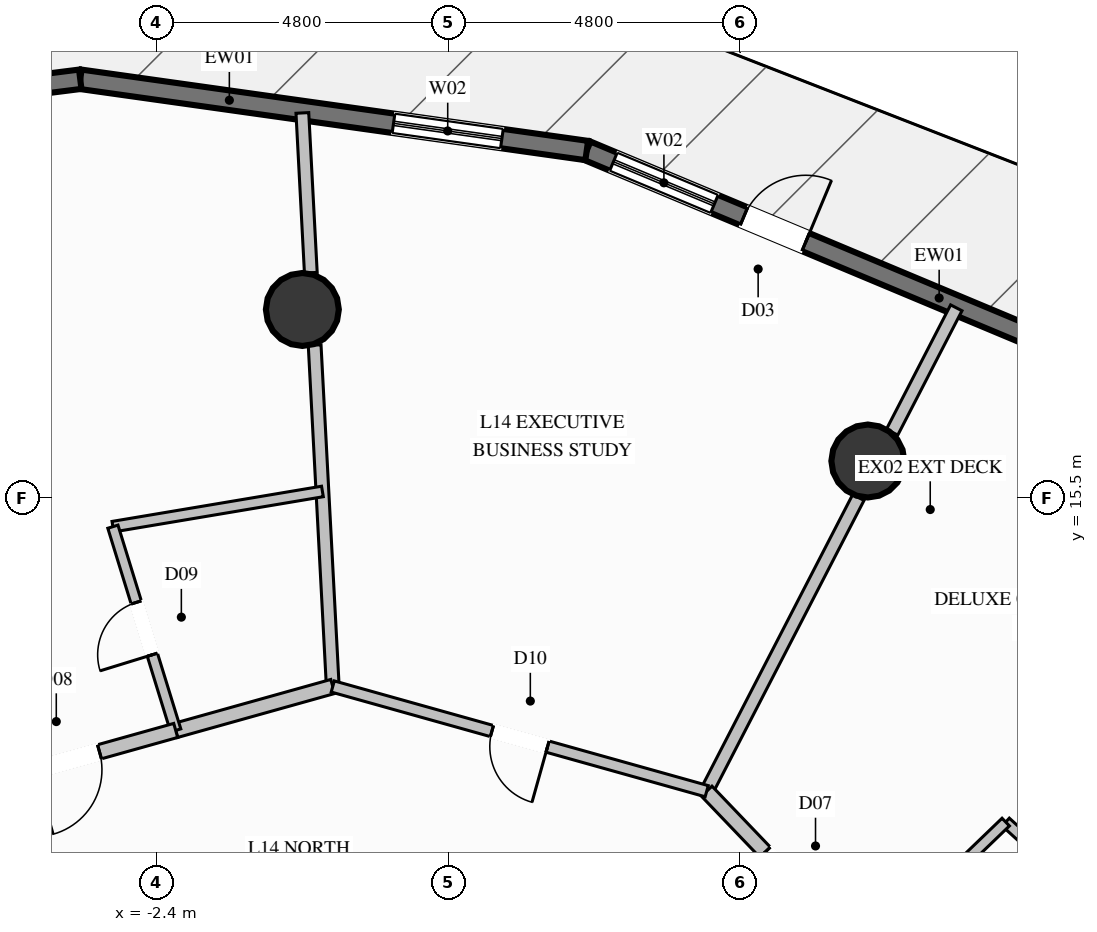
"""IFC4 building model, lengths in metres.
Left out: names, types, materials, properties, quantities, classifications, styles, units other than length and angle.
Written with IfcOpenShell. Run it as: python <this file> out.ifc"""

import sys

from ifc_helpers import new_model, si_unit, direction, frame, frame_2d, origin, origin_2d, place, context, subcontext, project, spatial, rectangle, circle, extrude, element, fill, save


model = new_model("IFC4")
c1 = context("Model", 3, precision=1e-05, world=origin(), true_north=direction((0.0, 1.0)))
c2 = subcontext(c1, "Body", "Model", "MODEL_VIEW")
j1 = project(units=[si_unit("LENGTHUNIT", "METRE"), si_unit("PLANEANGLEUNIT", "RADIAN")], contexts=[c1])
p1 = place(None, origin())
s1 = spatial("IfcSite", under=j1, at=p1, CompositionType="ELEMENT")
p2 = place(p1, origin())
s2 = spatial("IfcBuilding", under=s1, at=p2, CompositionType="ELEMENT")
p3 = place(p2, frame((0.0, 0.0, 60.8)))
s3 = spatial("IfcBuildingStorey", under=s2, at=p3, CompositionType="ELEMENT", Elevation=60.8)
for number, where, z_axis, x_axis in (
    (1, (9.3, 16.108, 0.0), (0.0, 0.0, 1.0), (1.0, 0.0, 0.0)),
    (2, (0.0, 18.6, 0.0), (0.0, 0.0, 1.0), (1.0, 0.0, 0.0)),
):
    element("IfcColumn", number, at=place(p3, frame(where, z_axis=z_axis, x_axis=x_axis)), inside=s3, PredefinedType="COLUMN", context=c2, shape_type="SweptSolid", body=[
        extrude(circle(Radius=0.6, at=origin_2d()), origin(), (0.0, 0.0, 1.0), 3.6),
    ])
p4 = place(p3, frame((4.677, 21.214, 0.0), z_axis=(0.0, 0.0, 1.0), x_axis=(0.922472234025, -0.386063437084, 0.0)))
e3 = element("IfcWall", 3, at=p4, inside=s3, PredefinedType="SOLIDWALL", context=c2, shape_type="SweptSolid", body=[
    extrude(rectangle(XDim=8.413, YDim=0.32, at=frame_2d((4.207, 0.0))), origin(), (0.0, 0.0, 1.0), 3.34),
])
p5 = place(p4, frame((0.476, 0.0, 0.35)))
e4 = element("IfcOpeningElement", 4, at=p5, cuts=e3, PredefinedType="OPENING", context=c2, shape_type="SweptSolid", body=[
    extrude(rectangle(XDim=1.8, YDim=2.6, at=frame_2d((0.9, 1.3))), frame((0.0, 0.17, 0.0), z_axis=(0.0, -1.0, 0.0), x_axis=(1.0, 0.0, 0.0)), (0.0, 0.0, 1.0), 0.34),
])
p6 = place(p4, frame((2.803, 0.0, 0.0)))
e5 = element("IfcOpeningElement", 5, at=p6, cuts=e3, PredefinedType="OPENING", context=c2, shape_type="SweptSolid", body=[
    extrude(rectangle(XDim=1.1, YDim=2.2, at=frame_2d((0.55, 1.1))), frame((0.0, 0.17, 0.0), z_axis=(0.0, -1.0, 0.0), x_axis=(1.0, 0.0, 0.0)), (0.0, 0.0, 1.0), 0.34),
])
p7 = place(p3, frame((-3.653, 22.386, 0.0), z_axis=(0.0, 0.0, 1.0), x_axis=(0.990249073368, -0.139308193205, 0.0)))
e6 = element("IfcWall", 6, at=p7, inside=s3, PredefinedType="SOLIDWALL", context=c2, shape_type="SweptSolid", body=[
    extrude(rectangle(XDim=8.412, YDim=0.32, at=frame_2d((4.206, 0.0))), origin(), (0.0, 0.0, 1.0), 3.34),
])
p8 = place(p7, frame((5.203, 0.0, 0.35)))
e7 = element("IfcOpeningElement", 7, at=p8, cuts=e6, PredefinedType="OPENING", context=c2, shape_type="SweptSolid", body=[
    extrude(rectangle(XDim=1.8, YDim=2.6, at=frame_2d((0.9, 1.3))), frame((0.0, 0.17, 0.0), z_axis=(0.0, -1.0, 0.0), x_axis=(1.0, 0.0, 0.0)), (0.0, 0.0, 1.0), 0.34),
])
p9 = place(p3, frame((-11.739, 21.366, 0.0), z_axis=(0.0, 0.0, 1.0), x_axis=(0.992137142599, 0.125155464426, 0.0)))
e8 = element("IfcWall", 8, at=p9, inside=s3, PredefinedType="SOLIDWALL", context=c2, shape_type="SweptSolid", body=[
    extrude(rectangle(XDim=8.15, YDim=0.32, at=frame_2d((4.075, 0.0))), origin(), (0.0, 0.0, 1.0), 3.34),
])
p10 = place(p9, frame((3.175, 0.0, 0.35)))
e9 = element("IfcOpeningElement", 9, at=p10, cuts=e8, PredefinedType="OPENING", context=c2, shape_type="SweptSolid", body=[
    extrude(rectangle(XDim=1.8, YDim=2.6, at=frame_2d((0.9, 1.3))), frame((0.0, 0.17, 0.0), z_axis=(0.0, -1.0, 0.0), x_axis=(1.0, 0.0, 0.0)), (0.0, 0.0, 1.0), 0.34),
])
p11 = place(p3, frame((6.65, 10.678, 0.0), z_axis=(0.0, 0.0, 1.0), x_axis=(0.458816800398, 0.888530890669, 0.0)))
e10 = element("IfcWall", 10, at=p11, inside=s3, PredefinedType="PARTITIONING", context=c2, shape_type="SweptSolid", body=[
    extrude(rectangle(XDim=5.436, YDim=0.21, at=frame_2d((2.718, 0.0))), origin(), (0.0, 0.0, 1.0), 2.709),
])
p12 = place(p3, frame((9.699, 16.582, 0.0), z_axis=(0.0, 0.0, 1.0), x_axis=(0.45880233967, 0.888538357705, 0.0)))
e11 = element("IfcWall", 11, at=p12, inside=s3, PredefinedType="PARTITIONING", context=c2, shape_type="SweptSolid", body=[
    extrude(rectangle(XDim=2.302, YDim=0.21, at=frame_2d((1.151, 0.0))), origin(), (0.0, 0.0, 1.0), 3.34),
])
p13 = place(p3, frame((0.5, 12.4, 0.0), z_axis=(0.0, 0.0, 1.0), x_axis=(-0.053023803289, 0.998593248668, 0.0)))
e12 = element("IfcWall", 12, at=p13, inside=s3, PredefinedType="PARTITIONING", context=c2, shape_type="SweptSolid", body=[
    extrude(rectangle(XDim=5.622, YDim=0.21, at=frame_2d((2.811, 0.0))), origin(), (0.0, 0.0, 1.0), 2.709),
])
p14 = place(p3, frame((0.139, 19.204, 0.0), z_axis=(0.0, 0.0, 1.0), x_axis=(-0.05278768825, 0.998605758029, 0.0)))
e13 = element("IfcWall", 13, at=p14, inside=s3, PredefinedType="PARTITIONING", context=c2, shape_type="SweptSolid", body=[
    extrude(rectangle(XDim=2.632, YDim=0.21, at=frame_2d((1.316, 0.0))), origin(), (0.0, 0.0, 1.0), 3.34),
])
p15 = place(p3, frame((0.5, 12.4, 0.0), z_axis=(0.0, 0.0, 1.0), x_axis=(-0.962997098558, -0.269511758869, 0.0)))
e14 = element("IfcWall", 14, at=p15, inside=s3, PredefinedType="PARTITIONING", context=c2, shape_type="SweptSolid", body=[
    extrude(rectangle(XDim=2.682, YDim=0.24, at=frame_2d((1.341, 0.0))), origin(), (0.0, 0.0, 1.0), 3.34),
])
p16 = place(p3, frame((0.33, 15.607, 0.0), z_axis=(0.0, 0.0, 1.0), x_axis=(-0.986183518822, -0.165656473477, 0.0)))
e15 = element("IfcWall", 15, at=p16, inside=s3, PredefinedType="PLUMBINGWALL", context=c2, shape_type="SweptSolid", body=[
    extrude(rectangle(XDim=3.494, YDim=0.175, at=frame_2d((1.747, 0.0))), origin(), (0.0, 0.0, 1.0), 3.34),
])
p17 = place(p3, frame((-2.083, 11.677, 0.0), z_axis=(0.0, 0.0, 1.0), x_axis=(-0.294570153527, 0.955629857555, 0.0)))
e16 = element("IfcWall", 16, at=p17, inside=s3, PredefinedType="PLUMBINGWALL", context=c2, shape_type="SweptSolid", body=[
    extrude(rectangle(XDim=3.507, YDim=0.175, at=frame_2d((1.753, 0.0))), origin(), (0.0, 0.0, 1.0), 3.34),
])
p18 = place(p17, frame((1.303, 0.0, 0.0)))
e17 = element("IfcOpeningElement", 17, at=p18, cuts=e16, PredefinedType="OPENING", context=c2, shape_type="SweptSolid", body=[
    extrude(rectangle(XDim=0.9, YDim=2.1, at=frame_2d((0.45, 1.05))), frame((0.0, 0.098, 0.0), z_axis=(0.0, -1.0, 0.0), x_axis=(1.0, 0.0, 0.0)), (0.0, 0.0, 1.0), 0.195),
])
p19 = place(p3, frame((-2.083, 11.677, 0.0), z_axis=(0.0, 0.0, 1.0), x_axis=(-0.962943481199, -0.269703266603, 0.0)))
e18 = element("IfcWall", 18, at=p19, inside=s3, PredefinedType="PARTITIONING", context=c2, shape_type="SweptSolid", body=[
    extrude(rectangle(XDim=3.704, YDim=0.24, at=frame_2d((1.852, 0.0))), origin(), (0.0, 0.0, 1.0), 3.34),
])
p20 = place(p19, frame((1.302, 0.0, 0.0)))
e19 = element("IfcOpeningElement", 19, at=p20, cuts=e18, PredefinedType="OPENING", context=c2, shape_type="SweptSolid", body=[
    extrude(rectangle(XDim=1.1, YDim=2.3, at=frame_2d((0.55, 1.15))), frame((0.0, 0.13, 0.0), z_axis=(0.0, -1.0, 0.0), x_axis=(1.0, 0.0, 0.0)), (0.0, 0.0, 1.0), 0.26),
])
p21 = place(p3, frame((14.118, 7.845, 0.0), z_axis=(0.0, 0.0, 1.0), x_axis=(-0.738937194697, 0.673774311097, 0.0)))
e20 = element("IfcWall", 20, at=p21, inside=s3, PredefinedType="PLUMBINGWALL", context=c2, shape_type="SweptSolid", body=[
    extrude(rectangle(XDim=3.451, YDim=0.175, at=frame_2d((1.725, 0.0))), origin(), (0.0, 0.0, 1.0), 3.34),
])
p22 = place(p3, frame((9.261, 7.95, 0.0), z_axis=(0.0, 0.0, 1.0), x_axis=(0.720586854317, 0.693364684265, 0.0)))
e21 = element("IfcWall", 21, at=p22, inside=s3, PredefinedType="PLUMBINGWALL", context=c2, shape_type="SweptSolid", body=[
    extrude(rectangle(XDim=3.202, YDim=0.175, at=frame_2d((1.601, 0.0))), origin(), (0.0, 0.0, 1.0), 3.34),
])
p23 = place(p22, frame((1.151, 0.0, 0.0)))
e22 = element("IfcOpeningElement", 22, at=p23, cuts=e21, PredefinedType="OPENING", context=c2, shape_type="SweptSolid", body=[
    extrude(rectangle(XDim=0.9, YDim=2.1, at=frame_2d((0.45, 1.05))), frame((0.0, 0.098, 0.0), z_axis=(0.0, -1.0, 0.0), x_axis=(1.0, 0.0, 0.0)), (0.0, 0.0, 1.0), 0.195),
])
p24 = place(p3, frame((9.261, 7.95, 0.0), z_axis=(0.0, 0.0, 1.0), x_axis=(-0.691453073155, 0.722421378161, 0.0)))
e23 = element("IfcWall", 23, at=p24, inside=s3, PredefinedType="PARTITIONING", context=c2, shape_type="SweptSolid", body=[
    extrude(rectangle(XDim=3.776, YDim=0.24, at=frame_2d((1.888, 0.0))), origin(), (0.0, 0.0, 1.0), 3.34),
])
p25 = place(p24, frame((1.388, 0.0, 0.0)))
e24 = element("IfcOpeningElement", 24, at=p25, cuts=e23, PredefinedType="OPENING", context=c2, shape_type="SweptSolid", body=[
    extrude(rectangle(XDim=1.0, YDim=2.2, at=frame_2d((0.5, 1.1))), frame((0.0, 0.13, 0.0), z_axis=(0.0, -1.0, 0.0), x_axis=(1.0, 0.0, 0.0)), (0.0, 0.0, 1.0), 0.26),
])
p26 = place(p3, frame((6.65, 10.678, 0.0), z_axis=(0.0, 0.0, 1.0), x_axis=(-0.962966004827, 0.26962283573, 0.0)))
e25 = element("IfcWall", 25, at=p26, inside=s3, PredefinedType="PARTITIONING", context=c2, shape_type="SweptSolid", body=[
    extrude(rectangle(XDim=6.386, YDim=0.19, at=frame_2d((3.193, 0.0))), origin(), (0.0, 0.0, 1.0), 3.34),
])
p27 = place(p26, frame((2.718, 0.0, 0.0)))
e26 = element("IfcOpeningElement", 26, at=p27, cuts=e25, PredefinedType="OPENING", context=c2, shape_type="SweptSolid", body=[
    extrude(rectangle(XDim=0.95, YDim=2.1, at=frame_2d((0.475, 1.05))), frame((0.0, 0.105, 0.0), z_axis=(0.0, -1.0, 0.0), x_axis=(1.0, 0.0, 0.0)), (0.0, 0.0, 1.0), 0.21),
])
p28 = place(p5, origin())
e27 = element("IfcWindow", 27, at=p28, inside=s3, PartitioningType="SINGLE_PANEL", PredefinedType="WINDOW", context=c2, shape_type="SweptSolid", body=[
    extrude(rectangle(XDim=1.8, YDim=2.6, at=frame_2d((0.9, 1.3))), frame((0.0, 0.03, 0.0), z_axis=(0.0, -1.0, 0.0), x_axis=(1.0, 0.0, 0.0)), (0.0, 0.0, 1.0), 0.06),
])
fill(e4, e27)
p29 = place(p6, origin())
e28 = element("IfcDoor", 28, at=p29, inside=s3, OperationType="SINGLE_SWING_RIGHT", PredefinedType="DOOR", context=c2, shape_type="SweptSolid", body=[
    extrude(rectangle(XDim=1.1, YDim=2.2, at=frame_2d((0.55, 1.1))), frame((0.0, 0.025, 0.0), z_axis=(0.0, -1.0, 0.0), x_axis=(1.0, 0.0, 0.0)), (0.0, 0.0, 1.0), 0.05),
])
fill(e5, e28)
p30 = place(p8, origin())
e29 = element("IfcWindow", 29, at=p30, inside=s3, PartitioningType="SINGLE_PANEL", PredefinedType="WINDOW", context=c2, shape_type="SweptSolid", body=[
    extrude(rectangle(XDim=1.8, YDim=2.6, at=frame_2d((0.9, 1.3))), frame((0.0, 0.03, 0.0), z_axis=(0.0, -1.0, 0.0), x_axis=(1.0, 0.0, 0.0)), (0.0, 0.0, 1.0), 0.06),
])
fill(e7, e29)
p31 = place(p18, origin())
e30 = element("IfcDoor", 30, at=p31, inside=s3, OperationType="SINGLE_SWING_LEFT", PredefinedType="DOOR", context=c2, shape_type="SweptSolid", body=[
    extrude(rectangle(XDim=0.9, YDim=2.1, at=frame_2d((0.45, 1.05))), frame((0.0, 0.025, 0.0), z_axis=(0.0, -1.0, 0.0), x_axis=(1.0, 0.0, 0.0)), (0.0, 0.0, 1.0), 0.05),
])
fill(e17, e30)
p32 = place(p20, origin())
e31 = element("IfcDoor", 31, at=p32, inside=s3, OperationType="SINGLE_SWING_RIGHT", PredefinedType="DOOR", context=c2, shape_type="SweptSolid", body=[
    extrude(rectangle(XDim=1.1, YDim=2.3, at=frame_2d((0.55, 1.15))), frame((0.0, 0.025, 0.0), z_axis=(0.0, -1.0, 0.0), x_axis=(1.0, 0.0, 0.0)), (0.0, 0.0, 1.0), 0.05),
])
fill(e19, e31)
p33 = place(p25, origin())
e32 = element("IfcDoor", 32, at=p33, inside=s3, OperationType="SINGLE_SWING_RIGHT", PredefinedType="DOOR", context=c2, shape_type="SweptSolid", body=[
    extrude(rectangle(XDim=1.0, YDim=2.2, at=frame_2d((0.5, 1.1))), frame((0.0, 0.025, 0.0), z_axis=(0.0, -1.0, 0.0), x_axis=(1.0, 0.0, 0.0)), (0.0, 0.0, 1.0), 0.05),
])
fill(e24, e32)
p34 = place(p27, origin())
e33 = element("IfcDoor", 33, at=p34, inside=s3, OperationType="SINGLE_SWING_LEFT", PredefinedType="DOOR", context=c2, shape_type="SweptSolid", body=[
    extrude(rectangle(XDim=0.95, YDim=2.1, at=frame_2d((0.475, 1.05))), frame((0.0, 0.025, 0.0), z_axis=(0.0, -1.0, 0.0), x_axis=(1.0, 0.0, 0.0)), (0.0, 0.0, 1.0), 0.05),
])
fill(e26, e33)
save(model, sys.argv[1])
